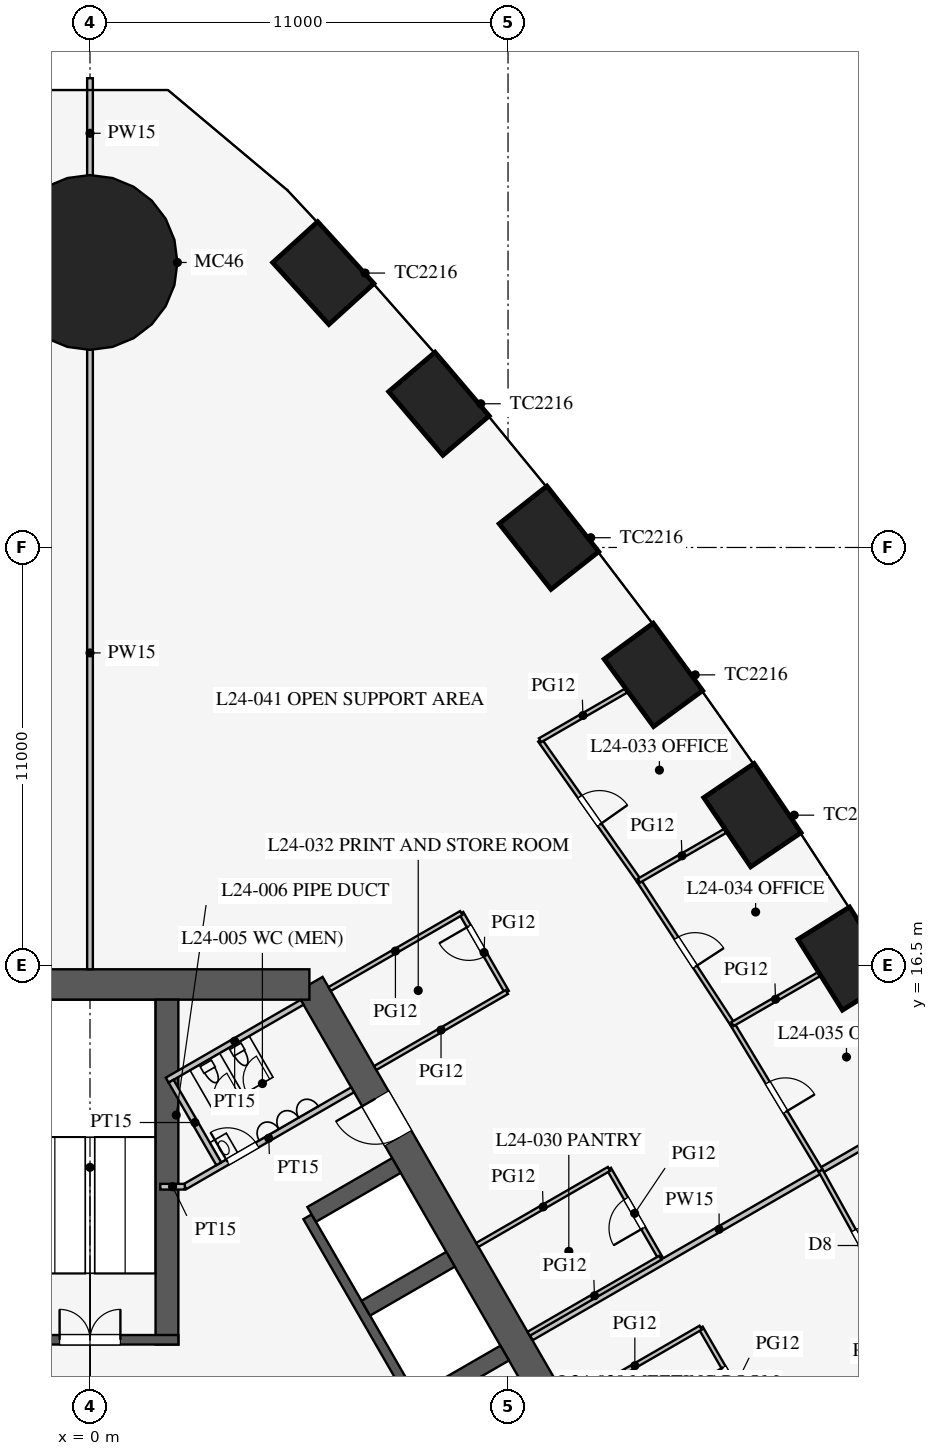
"""IFC4 building model, lengths in metres.
Left out: names, types, materials, properties, quantities, classifications, styles, units other than length and angle.
Written with IfcOpenShell. Run it as: python <this file> out.ifc"""

import sys

from ifc_helpers import new_model, si_unit, direction, frame, frame_2d, origin, origin_2d, place, context, subcontext, project, spatial, rectangle, circle, extrude, element, fill, save


model = new_model("IFC4")
c1 = context("Model", 3, precision=1e-05, world=origin(), true_north=direction((0.0, 1.0)))
c2 = subcontext(c1, "Body", "Model", "MODEL_VIEW")
j1 = project(units=[si_unit("LENGTHUNIT", "METRE"), si_unit("PLANEANGLEUNIT", "RADIAN")], contexts=[c1])
p1 = place(None, origin())
s1 = spatial("IfcSite", under=j1, at=p1, CompositionType="ELEMENT")
p2 = place(p1, origin())
s2 = spatial("IfcBuilding", under=s1, at=p2, CompositionType="ELEMENT")
p3 = place(p2, frame((0.0, 0.0, 107.3)))
s3 = spatial("IfcBuildingStorey", under=s2, at=p3, CompositionType="ELEMENT", Elevation=107.3)
for number, where, z_axis, x_axis in (
    (1, (19.893, 16.681, 0.0), (0.0, 0.0, 1.0), (-0.531, 0.847, 0.0)),
    (2, (17.43, 20.456, 0.0), (0.0, 0.0, 1.0), (-0.561, 0.828, 0.0)),
    (3, (14.825, 24.148, 0.0), (0.0, 0.0, 1.0), (-0.591, 0.807, 0.0)),
    (4, (12.077, 27.757, 0.0), (0.0, 0.0, 1.0), (-0.62, 0.785, 0.0)),
    (5, (9.182, 31.282, 0.0), (0.0, 0.0, 1.0), (-0.648, 0.762, 0.0)),
    (6, (6.139, 34.721, 0.0), (0.0, 0.0, 1.0), (-0.672, 0.74, 0.0)),
):
    element("IfcColumn", number, at=place(p3, frame(where, z_axis=z_axis, x_axis=x_axis)), inside=s3, PredefinedType="COLUMN", context=c2, shape_type="SweptSolid", body=[
        extrude(rectangle(XDim=2.2, YDim=1.6, at=origin_2d()), origin(), (0.0, 0.0, 1.0), 4.2),
    ])
p4 = place(p3, frame((0.0, 35.0, 0.0), z_axis=(0.0, 0.0, 1.0), x_axis=(1.0, 0.0, 0.0)))
e7 = element("IfcColumn", 7, at=p4, inside=s3, PredefinedType="COLUMN", context=c2, shape_type="SweptSolid", body=[
    extrude(circle(Radius=2.3, at=origin_2d()), origin(), (0.0, 0.0, 1.0), 4.2),
])
p5 = place(p3, frame((16.743, -3.0, 0.0), z_axis=(0.0, 0.0, 1.0), x_axis=(-0.500002442456, 0.866023993627, 0.0)))
e8 = element("IfcWall", 8, at=p5, inside=s3, PredefinedType="SHEAR", context=c2, shape_type="SweptSolid", body=[
    extrude(rectangle(XDim=21.939, YDim=0.8, at=frame_2d((10.97, 0.0))), origin(), (0.0, 0.0, 1.0), 4.2),
])
p6 = place(p5, frame((17.27, 0.0, 0.0)))
e9 = element("IfcOpeningElement", 9, at=p6, cuts=e8, PredefinedType="OPENING", context=c2, shape_type="SweptSolid", body=[
    extrude(rectangle(XDim=1.2, YDim=2.1, at=frame_2d((0.6, 1.05))), frame((0.0, 0.41, 0.0), z_axis=(0.0, -1.0, 0.0), x_axis=(1.0, 0.0, 0.0)), (0.0, 0.0, 1.0), 0.82),
])
p7 = place(p5, frame((3.47, 0.0, 0.0)))
e10 = element("IfcOpeningElement", 10, at=p7, cuts=e8, PredefinedType="OPENING", context=c2, shape_type="SweptSolid", body=[
    extrude(rectangle(XDim=1.2, YDim=2.1, at=frame_2d((0.6, 1.05))), frame((0.0, 0.41, 0.0), z_axis=(0.0, -1.0, 0.0), x_axis=(1.0, 0.0, 0.0)), (0.0, 0.0, 1.0), 0.82),
])
p8 = place(p3, frame((5.773, 16.0, 0.0), z_axis=(0.0, 0.0, 1.0), x_axis=(-1.0, 0.0, 0.0)))
e11 = element("IfcWall", 11, at=p8, inside=s3, PredefinedType="SHEAR", context=c2, shape_type="SweptSolid", body=[
    extrude(rectangle(XDim=11.547, YDim=0.8, at=frame_2d((5.773, 0.0))), origin(), (0.0, 0.0, 1.0), 4.2),
])
p9 = place(p3, frame((11.424, 0.014, 0.0), z_axis=(0.0, 0.0, 1.0), x_axis=(-0.500001763848, 0.866024385424, 0.0)))
e12 = element("IfcWall", 12, at=p9, inside=s3, PredefinedType="SHEAR", context=c2, shape_type="SweptSolid", body=[
    extrude(rectangle(XDim=11.4, YDim=0.25, at=frame_2d((5.7, 0.0))), origin(), (0.0, 0.0, 1.0), 4.2),
])
p10 = place(p9, frame((0.975, 0.0, 0.0)))
e13 = element("IfcOpeningElement", 13, at=p10, cuts=e12, PredefinedType="OPENING", context=c2, shape_type="SweptSolid", body=[
    extrude(rectangle(XDim=0.9, YDim=2.1, at=frame_2d((0.45, 1.05))), frame((0.0, 0.135, 0.0), z_axis=(0.0, -1.0, 0.0), x_axis=(1.0, 0.0, 0.0)), (0.0, 0.0, 1.0), 0.27),
])
p11 = place(p9, frame((3.825, 0.0, 0.0)))
e14 = element("IfcOpeningElement", 14, at=p11, cuts=e12, PredefinedType="OPENING", context=c2, shape_type="SweptSolid", body=[
    extrude(rectangle(XDim=0.9, YDim=2.1, at=frame_2d((0.45, 1.05))), frame((0.0, 0.135, 0.0), z_axis=(0.0, -1.0, 0.0), x_axis=(1.0, 0.0, 0.0)), (0.0, 0.0, 1.0), 0.27),
])
for number, where, z_axis, x_axis in (
    (15, (8.682, 5.012, 0.0), (0.0, 0.0, 1.0), (0.866, 0.5, 0.0)),
    (16, (7.257, 7.481, 0.0), (0.0, 0.0, 1.0), (0.866, 0.5, 0.0)),
):
    element("IfcWall", number, at=place(p3, frame(where, z_axis=z_axis, x_axis=x_axis)), inside=s3, PredefinedType="SHEAR", context=c2, shape_type="SweptSolid", body=[
        extrude(rectangle(XDim=2.575, YDim=0.45, at=frame_2d((1.288, 0.0))), origin(), (0.0, 0.0, 1.0), 4.2),
    ])
p12 = place(p3, frame((5.832, 9.949, 0.0), z_axis=(0.0, 0.0, 1.0), x_axis=(0.866029291668, 0.499993265928, 0.0)))
e17 = element("IfcWall", 17, at=p12, inside=s3, PredefinedType="SHEAR", context=c2, shape_type="SweptSolid", body=[
    extrude(rectangle(XDim=2.575, YDim=0.45, at=frame_2d((1.288, 0.0))), origin(), (0.0, 0.0, 1.0), 4.2),
])
p13 = place(p3, frame((2.025, 6.525, 0.0), z_axis=(0.0, 0.0, 1.0), x_axis=(0.0, 1.0, 0.0)))
e18 = element("IfcWall", 18, at=p13, inside=s3, PredefinedType="SHEAR", context=c2, shape_type="SweptSolid", body=[
    extrude(rectangle(XDim=9.075, YDim=0.6, at=frame_2d((4.538, 0.0))), origin(), (0.0, 0.0, 1.0), 4.2),
])
p14 = place(p3, frame((2.325, 6.65, 0.0), z_axis=(0.0, 0.0, 1.0), x_axis=(-1.0, 0.0, 0.0)))
e19 = element("IfcWall", 19, at=p14, inside=s3, PredefinedType="SHEAR", context=c2, shape_type="SweptSolid", body=[
    extrude(rectangle(XDim=4.65, YDim=0.25, at=frame_2d((2.325, 0.0))), origin(), (0.0, 0.0, 1.0), 4.2),
])
p15 = place(p14, frame((1.525, 0.0, 0.0)))
e20 = element("IfcOpeningElement", 20, at=p15, cuts=e19, PredefinedType="OPENING", context=c2, shape_type="SweptSolid", body=[
    extrude(rectangle(XDim=1.6, YDim=2.1, at=frame_2d((0.8, 1.05))), frame((0.0, 0.135, 0.0), z_axis=(0.0, -1.0, 0.0), x_axis=(1.0, 0.0, 0.0)), (0.0, 0.0, 1.0), 0.27),
])
p16 = place(p3, frame((2.495, 10.678, 0.0), z_axis=(0.0, 0.0, 1.0), x_axis=(0.86602216432, 0.500005610874, 0.0)))
e21 = element("IfcWall", 21, at=p16, inside=s3, PredefinedType="PARTITIONING", context=c2, shape_type="SweptSolid", body=[
    extrude(rectangle(XDim=5.1, YDim=0.15, at=frame_2d((2.55, 0.0))), origin(), (0.0, 0.0, 1.0), 4.0),
])
p17 = place(p16, frame((1.3, 0.0, 0.0)))
e22 = element("IfcOpeningElement", 22, at=p17, cuts=e21, PredefinedType="OPENING", context=c2, shape_type="SweptSolid", body=[
    extrude(rectangle(XDim=0.9, YDim=2.1, at=frame_2d((0.45, 1.05))), frame((0.0, 0.085, 0.0), z_axis=(0.0, -1.0, 0.0), x_axis=(1.0, 0.0, 0.0)), (0.0, 0.0, 1.0), 0.17),
])
p18 = place(p3, frame((2.495, 10.678, 0.0), z_axis=(0.0, 0.0, 1.0), x_axis=(-1.0, 0.0, 0.0)))
e23 = element("IfcWall", 23, at=p18, inside=s3, PredefinedType="PARTITIONING", context=c2, shape_type="SweptSolid", body=[
    extrude(rectangle(XDim=0.645, YDim=0.15, at=frame_2d((0.323, 0.0))), origin(), (0.0, 0.0, 1.0), 4.0),
])
p19 = place(p3, frame((2.031, 13.482, 0.0), z_axis=(0.0, 0.0, 1.0), x_axis=(0.866050731258, 0.499956128963, 0.0)))
e24 = element("IfcWall", 24, at=p19, inside=s3, PredefinedType="PARTITIONING", context=c2, shape_type="SweptSolid", body=[
    extrude(rectangle(XDim=4.1, YDim=0.15, at=frame_2d((2.05, 0.0))), origin(), (0.0, 0.0, 1.0), 4.0),
])
p20 = place(p3, frame((3.389, 11.281, 0.0), z_axis=(0.0, 0.0, 1.0), x_axis=(-0.499989096993, 0.866031698547, 0.0)))
e25 = element("IfcWall", 25, at=p20, inside=s3, PredefinedType="PARTITIONING", context=c2, shape_type="SweptSolid", body=[
    extrude(rectangle(XDim=2.51, YDim=0.15, at=frame_2d((1.255, 0.0))), origin(), (0.0, 0.0, 1.0), 4.0),
])
p21 = place(p3, frame((0.0, 16.4, 0.0), z_axis=(0.0, 0.0, 1.0), x_axis=(0.0, 1.0, 0.0)))
e26 = element("IfcWall", 26, at=p21, inside=s3, PredefinedType="PARTITIONING", context=c2, shape_type="SweptSolid", body=[
    extrude(rectangle(XDim=16.65, YDim=0.15, at=frame_2d((8.325, 0.0))), origin(), (0.0, 0.0, 1.0), 2.3),
])
p22 = place(p3, frame((0.0, 36.95, 0.0), z_axis=(0.0, 0.0, 1.0), x_axis=(0.0, 1.0, 0.0)))
e27 = element("IfcWall", 27, at=p22, inside=s3, PredefinedType="PARTITIONING", context=c2, shape_type="SweptSolid", body=[
    extrude(rectangle(XDim=2.899, YDim=0.15, at=frame_2d((1.45, 0.0))), origin(), (0.0, 0.0, 1.0), 2.3),
])
p23 = place(p3, frame((11.613, 6.705, 0.0), z_axis=(0.0, 0.0, 1.0), x_axis=(0.866026306654, 0.499998436182, 0.0)))
e28 = element("IfcWall", 28, at=p23, inside=s3, PredefinedType="PARTITIONING", context=c2, shape_type="SweptSolid", body=[
    extrude(rectangle(XDim=11.41, YDim=0.15, at=frame_2d((5.705, 0.0))), origin(), (0.0, 0.0, 1.0), 2.8),
])
p24 = place(p3, frame((15.006, 8.808, 0.0), z_axis=(0.0, 0.0, 1.0), x_axis=(-0.500048589285, 0.86599734893, 0.0)))
e29 = element("IfcWall", 29, at=p24, inside=s3, PredefinedType="PARTITIONING", context=c2, shape_type="SweptSolid", body=[
    extrude(rectangle(XDim=2.7, YDim=0.12, at=frame_2d((1.35, 0.0))), origin(), (0.0, 0.0, 1.0), 2.9),
])
p25 = place(p24, frame((0.9, 0.0, 0.15)))
e30 = element("IfcOpeningElement", 30, at=p25, cuts=e29, PredefinedType="OPENING", context=c2, shape_type="SweptSolid", body=[
    extrude(rectangle(XDim=0.9, YDim=2.1, at=frame_2d((0.45, 1.05))), frame((0.0, 0.07, 0.0), z_axis=(0.0, -1.0, 0.0), x_axis=(1.0, 0.0, 0.0)), (0.0, 0.0, 1.0), 0.14),
])
p26 = place(p3, frame((10.969, 15.802, 0.0), z_axis=(0.0, 0.0, 1.0), x_axis=(-0.500001309137, 0.866024647952, 0.0)))
e31 = element("IfcWall", 31, at=p26, inside=s3, PredefinedType="PARTITIONING", context=c2, shape_type="SweptSolid", body=[
    extrude(rectangle(XDim=2.4, YDim=0.12, at=frame_2d((1.2, 0.0))), origin(), (0.0, 0.0, 1.0), 2.9),
])
p27 = place(p26, frame((1.1, 0.0, 0.15)))
e32 = element("IfcOpeningElement", 32, at=p27, cuts=e31, PredefinedType="OPENING", context=c2, shape_type="SweptSolid", body=[
    extrude(rectangle(XDim=0.9, YDim=2.1, at=frame_2d((0.45, 1.05))), frame((0.0, 0.07, 0.0), z_axis=(0.0, -1.0, 0.0), x_axis=(1.0, 0.0, 0.0)), (0.0, 0.0, 1.0), 0.14),
])
p28 = place(p3, frame((17.869, 3.85, 0.0), z_axis=(0.0, 0.0, 1.0), x_axis=(-0.500012057535, 0.866018442252, 0.0)))
e33 = element("IfcWall", 33, at=p28, inside=s3, PredefinedType="PARTITIONING", context=c2, shape_type="SweptSolid", body=[
    extrude(rectangle(XDim=3.6, YDim=0.12, at=frame_2d((1.8, 0.0))), origin(), (0.0, 0.0, 1.0), 2.9),
])
p29 = place(p28, frame((1.4, 0.0, 0.15)))
e34 = element("IfcOpeningElement", 34, at=p29, cuts=e33, PredefinedType="OPENING", context=c2, shape_type="SweptSolid", body=[
    extrude(rectangle(XDim=1.0, YDim=2.1, at=frame_2d((0.5, 1.05))), frame((0.0, 0.07, 0.0), z_axis=(0.0, -1.0, 0.0), x_axis=(1.0, 0.0, 0.0)), (0.0, 0.0, 1.0), 0.14),
])
p30 = place(p3, frame((11.542, 6.808, 0.0), z_axis=(0.0, 0.0, 1.0), x_axis=(0.866026010844, 0.49999894854, 0.0)))
e35 = element("IfcWall", 35, at=p30, inside=s3, PredefinedType="PARTITIONING", context=c2, shape_type="SweptSolid", body=[
    extrude(rectangle(XDim=4.0, YDim=0.12, at=frame_2d((2.0, 0.0))), origin(), (0.0, 0.0, 1.0), 2.8),
])
for number, where, z_axis, x_axis in (
    (36, (6.305, 15.88, 0.0), (0.0, 0.0, 1.0), (0.866, 0.5, 0.0)),
    (37, (10.192, 9.146, 0.0), (0.0, 0.0, 1.0), (0.866, 0.5, 0.0)),
    (38, (7.505, 13.802, 0.0), (0.0, 0.0, 1.0), (0.866, 0.5, 0.0)),
    (39, (12.605, 4.968, 0.0), (0.0, 0.0, 1.0), (0.866, 0.5, 0.0)),
):
    element("IfcWall", number, at=place(p3, frame(where, z_axis=z_axis, x_axis=x_axis)), inside=s3, PredefinedType="PARTITIONING", context=c2, shape_type="SweptSolid", body=[
        extrude(rectangle(XDim=4.0, YDim=0.12, at=frame_2d((2.0, 0.0))), origin(), (0.0, 0.0, 1.0), 2.9),
    ])
p31 = place(p3, frame((19.226, 11.1, 0.0), z_axis=(0.0, 0.0, 1.0), x_axis=(-0.515548366618, 0.856860479703, 0.0)))
e40 = element("IfcWall", 40, at=p31, inside=s3, PredefinedType="PARTITIONING", context=c2, shape_type="SweptSolid", body=[
    extrude(rectangle(XDim=4.501, YDim=0.12, at=frame_2d((2.25, 0.0))), origin(), (0.0, 0.0, 1.0), 2.9),
])
p32 = place(p31, frame((1.8, 0.0, 0.15)))
e41 = element("IfcOpeningElement", 41, at=p32, cuts=e40, PredefinedType="OPENING", context=c2, shape_type="SweptSolid", body=[
    extrude(rectangle(XDim=0.9, YDim=2.1, at=frame_2d((0.45, 1.05))), frame((0.0, 0.07, 0.0), z_axis=(0.0, -1.0, 0.0), x_axis=(1.0, 0.0, 0.0)), (0.0, 0.0, 1.0), 0.14),
])
p33 = place(p3, frame((16.905, 14.956, 0.0), z_axis=(0.0, 0.0, 1.0), x_axis=(-0.546069464151, 0.837739900161, 0.0)))
e42 = element("IfcWall", 42, at=p33, inside=s3, PredefinedType="PARTITIONING", context=c2, shape_type="SweptSolid", body=[
    extrude(rectangle(XDim=4.507, YDim=0.12, at=frame_2d((2.253, 0.0))), origin(), (0.0, 0.0, 1.0), 2.9),
])
p34 = place(p33, frame((1.8, 0.0, 0.15)))
e43 = element("IfcOpeningElement", 43, at=p34, cuts=e42, PredefinedType="OPENING", context=c2, shape_type="SweptSolid", body=[
    extrude(rectangle(XDim=0.9, YDim=2.1, at=frame_2d((0.45, 1.05))), frame((0.0, 0.07, 0.0), z_axis=(0.0, -1.0, 0.0), x_axis=(1.0, 0.0, 0.0)), (0.0, 0.0, 1.0), 0.14),
])
p35 = place(p3, frame((14.444, 18.732, 0.0), z_axis=(0.0, 0.0, 1.0), x_axis=(-0.576023283708, 0.817433285734, 0.0)))
e44 = element("IfcWall", 44, at=p35, inside=s3, PredefinedType="PARTITIONING", context=c2, shape_type="SweptSolid", body=[
    extrude(rectangle(XDim=4.519, YDim=0.12, at=frame_2d((2.259, 0.0))), origin(), (0.0, 0.0, 1.0), 2.9),
])
p36 = place(p35, frame((1.8, 0.0, 0.15)))
e45 = element("IfcOpeningElement", 45, at=p36, cuts=e44, PredefinedType="OPENING", context=c2, shape_type="SweptSolid", body=[
    extrude(rectangle(XDim=0.9, YDim=2.1, at=frame_2d((0.45, 1.05))), frame((0.0, 0.07, 0.0), z_axis=(0.0, -1.0, 0.0), x_axis=(1.0, 0.0, 0.0)), (0.0, 0.0, 1.0), 0.14),
])
p37 = place(p3, frame((21.405, 7.162, 0.0), z_axis=(0.0, 0.0, 1.0), x_axis=(-0.484292898211, 0.874905931368, 0.0)))
e46 = element("IfcWall", 46, at=p37, inside=s3, PredefinedType="PARTITIONING", context=c2, shape_type="SweptSolid", body=[
    extrude(rectangle(XDim=4.501, YDim=0.12, at=frame_2d((2.25, 0.0))), origin(), (0.0, 0.0, 1.0), 2.9),
])
p38 = place(p37, frame((1.8, 0.0, 0.15)))
e47 = element("IfcOpeningElement", 47, at=p38, cuts=e46, PredefinedType="OPENING", context=c2, shape_type="SweptSolid", body=[
    extrude(rectangle(XDim=0.9, YDim=2.1, at=frame_2d((0.45, 1.05))), frame((0.0, 0.07, 0.0), z_axis=(0.0, -1.0, 0.0), x_axis=(1.0, 0.0, 0.0)), (0.0, 0.0, 1.0), 0.14),
])
p39 = place(p3, frame((11.842, 22.425, 0.0), z_axis=(0.0, 0.0, 1.0), x_axis=(0.866036074319, 0.499981517636, 0.0)))
e48 = element("IfcWall", 48, at=p39, inside=s3, PredefinedType="PARTITIONING", context=c2, shape_type="SweptSolid", body=[
    extrude(rectangle(XDim=2.61, YDim=0.12, at=frame_2d((1.305, 0.0))), origin(), (0.0, 0.0, 1.0), 2.6),
])
p40 = place(p3, frame((16.905, 14.956, 0.0), z_axis=(0.0, 0.0, 1.0), x_axis=(0.866008611403, 0.50002908413, 0.0)))
e49 = element("IfcWall", 49, at=p40, inside=s3, PredefinedType="PARTITIONING", context=c2, shape_type="SweptSolid", body=[
    extrude(rectangle(XDim=2.619, YDim=0.12, at=frame_2d((1.31, 0.0))), origin(), (0.0, 0.0, 1.0), 2.8),
])
p41 = place(p3, frame((14.444, 18.732, 0.0), z_axis=(0.0, 0.0, 1.0), x_axis=(0.866011491631, 0.500024095782, 0.0)))
e50 = element("IfcWall", 50, at=p41, inside=s3, PredefinedType="PARTITIONING", context=c2, shape_type="SweptSolid", body=[
    extrude(rectangle(XDim=2.615, YDim=0.12, at=frame_2d((1.308, 0.0))), origin(), (0.0, 0.0, 1.0), 2.9),
])
p42 = place(p17, origin())
e51 = element("IfcDoor", 51, at=p42, inside=s3, OperationType="SINGLE_SWING_LEFT", PredefinedType="DOOR", context=c2, shape_type="SweptSolid", body=[
    extrude(rectangle(XDim=0.9, YDim=2.1, at=frame_2d((0.45, 1.05))), frame((0.0, 0.025, 0.0), z_axis=(0.0, -1.0, 0.0), x_axis=(1.0, 0.0, 0.0)), (0.0, 0.0, 1.0), 0.05),
])
fill(e22, e51)
p43 = place(p15, frame((1.6, 0.0, 0.0), z_axis=(0.0, 0.0, 1.0), x_axis=(-1.0, 0.0, 0.0)))
e52 = element("IfcDoor", 52, at=p43, inside=s3, OperationType="DOUBLE_DOOR_SINGLE_SWING", PredefinedType="DOOR", context=c2, shape_type="SweptSolid", body=[
    extrude(rectangle(XDim=1.6, YDim=2.1, at=frame_2d((0.8, 1.05))), frame((0.0, 0.025, 0.0), z_axis=(0.0, -1.0, 0.0), x_axis=(1.0, 0.0, 0.0)), (0.0, 0.0, 1.0), 0.05),
])
fill(e20, e52)
p44 = place(p6, origin())
e53 = element("IfcDoor", 53, at=p44, inside=s3, OperationType="SINGLE_SWING_RIGHT", PredefinedType="DOOR", context=c2, shape_type="SweptSolid", body=[
    extrude(rectangle(XDim=1.2, YDim=2.1, at=frame_2d((0.6, 1.05))), frame((0.0, 0.025, 0.0), z_axis=(0.0, -1.0, 0.0), x_axis=(1.0, 0.0, 0.0)), (0.0, 0.0, 1.0), 0.05),
])
fill(e9, e53)
p45 = place(p29, origin())
e54 = element("IfcDoor", 54, at=p45, inside=s3, OperationType="SINGLE_SWING_RIGHT", PredefinedType="DOOR", context=c2, shape_type="SweptSolid", body=[
    extrude(rectangle(XDim=1.0, YDim=2.1, at=frame_2d((0.5, 1.05))), frame((0.0, 0.025, 0.0), z_axis=(0.0, -1.0, 0.0), x_axis=(1.0, 0.0, 0.0)), (0.0, 0.0, 1.0), 0.05),
])
fill(e34, e54)
p46 = place(p25, origin())
e55 = element("IfcDoor", 55, at=p46, inside=s3, OperationType="SINGLE_SWING_LEFT", PredefinedType="DOOR", context=c2, shape_type="SweptSolid", body=[
    extrude(rectangle(XDim=0.9, YDim=2.1, at=frame_2d((0.45, 1.05))), frame((0.0, 0.025, 0.0), z_axis=(0.0, -1.0, 0.0), x_axis=(1.0, 0.0, 0.0)), (0.0, 0.0, 1.0), 0.05),
])
fill(e30, e55)
p47 = place(p27, origin())
e56 = element("IfcDoor", 56, at=p47, inside=s3, OperationType="SINGLE_SWING_RIGHT", PredefinedType="DOOR", context=c2, shape_type="SweptSolid", body=[
    extrude(rectangle(XDim=0.9, YDim=2.1, at=frame_2d((0.45, 1.05))), frame((0.0, 0.025, 0.0), z_axis=(0.0, -1.0, 0.0), x_axis=(1.0, 0.0, 0.0)), (0.0, 0.0, 1.0), 0.05),
])
fill(e32, e56)
p48 = place(p36, frame((0.9, 0.0, 0.0), z_axis=(0.0, 0.0, 1.0), x_axis=(-1.0, 0.0, 0.0)))
e57 = element("IfcDoor", 57, at=p48, inside=s3, OperationType="SINGLE_SWING_RIGHT", PredefinedType="DOOR", context=c2, shape_type="SweptSolid", body=[
    extrude(rectangle(XDim=0.9, YDim=2.1, at=frame_2d((0.45, 1.05))), frame((0.0, 0.025, 0.0), z_axis=(0.0, -1.0, 0.0), x_axis=(1.0, 0.0, 0.0)), (0.0, 0.0, 1.0), 0.05),
])
fill(e45, e57)
p49 = place(p34, frame((0.9, 0.0, 0.0), z_axis=(0.0, 0.0, 1.0), x_axis=(-1.0, 0.0, 0.0)))
e58 = element("IfcDoor", 58, at=p49, inside=s3, OperationType="SINGLE_SWING_RIGHT", PredefinedType="DOOR", context=c2, shape_type="SweptSolid", body=[
    extrude(rectangle(XDim=0.9, YDim=2.1, at=frame_2d((0.45, 1.05))), frame((0.0, 0.025, 0.0), z_axis=(0.0, -1.0, 0.0), x_axis=(1.0, 0.0, 0.0)), (0.0, 0.0, 1.0), 0.05),
])
fill(e43, e58)
p50 = place(p32, frame((0.9, 0.0, 0.0), z_axis=(0.0, 0.0, 1.0), x_axis=(-1.0, 0.0, 0.0)))
e59 = element("IfcDoor", 59, at=p50, inside=s3, OperationType="SINGLE_SWING_RIGHT", PredefinedType="DOOR", context=c2, shape_type="SweptSolid", body=[
    extrude(rectangle(XDim=0.9, YDim=2.1, at=frame_2d((0.45, 1.05))), frame((0.0, 0.025, 0.0), z_axis=(0.0, -1.0, 0.0), x_axis=(1.0, 0.0, 0.0)), (0.0, 0.0, 1.0), 0.05),
])
fill(e41, e59)
p51 = place(p38, frame((0.9, 0.0, 0.0), z_axis=(0.0, 0.0, 1.0), x_axis=(-1.0, 0.0, 0.0)))
e60 = element("IfcDoor", 60, at=p51, inside=s3, OperationType="SINGLE_SWING_RIGHT", PredefinedType="DOOR", context=c2, shape_type="SweptSolid", body=[
    extrude(rectangle(XDim=0.9, YDim=2.1, at=frame_2d((0.45, 1.05))), frame((0.0, 0.025, 0.0), z_axis=(0.0, -1.0, 0.0), x_axis=(1.0, 0.0, 0.0)), (0.0, 0.0, 1.0), 0.05),
])
fill(e47, e60)
save(model, sys.argv[1])
